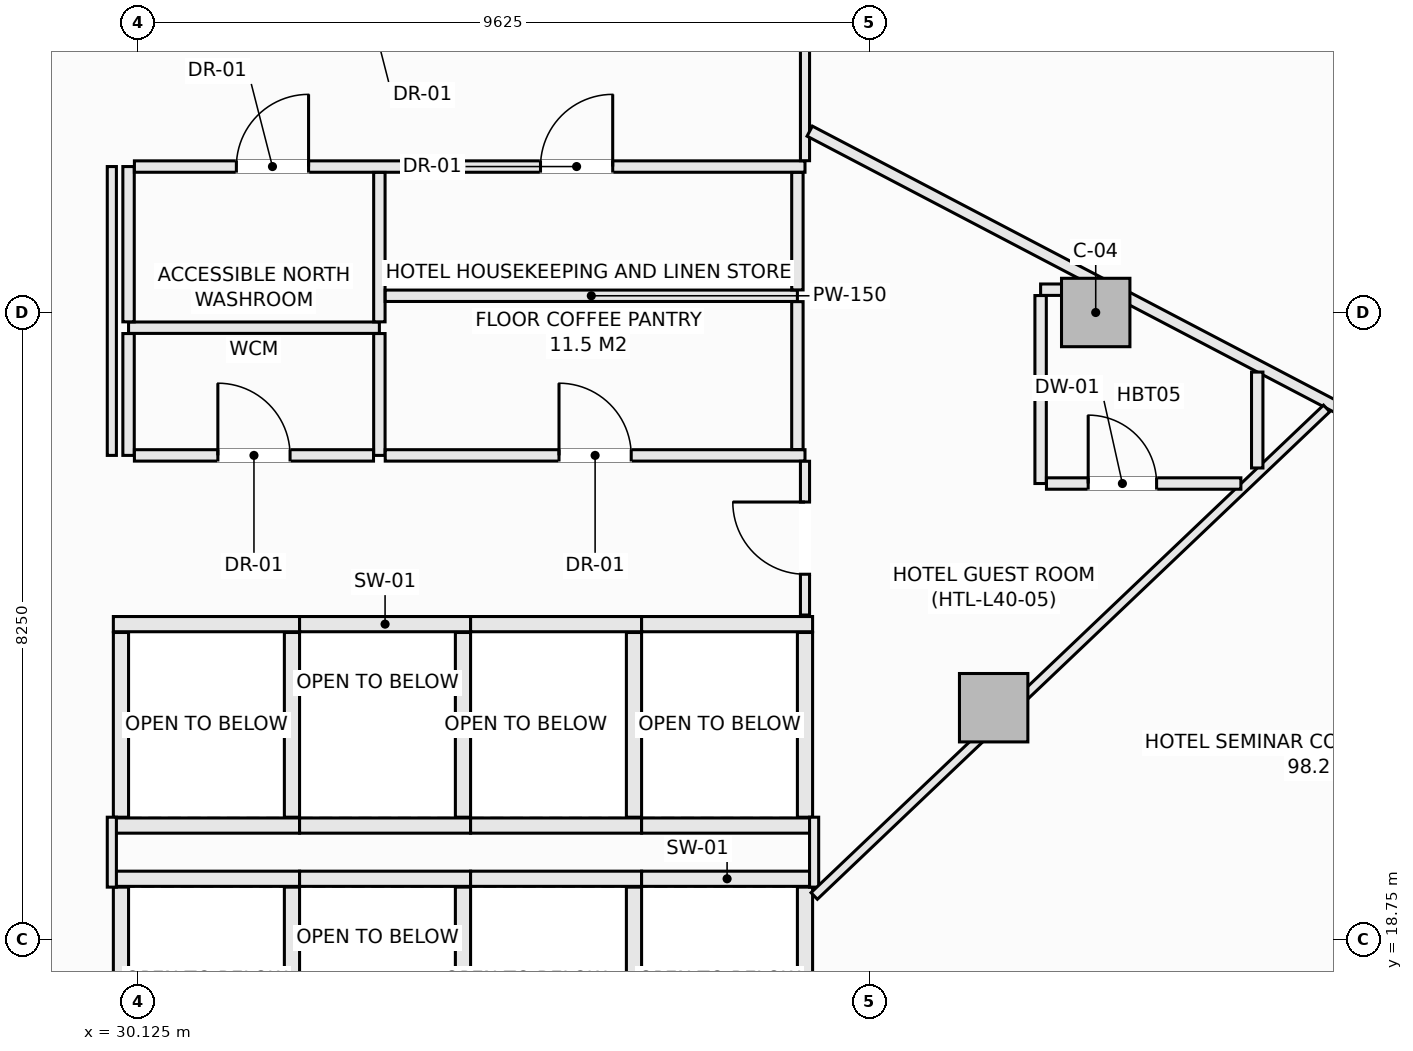
"""IFC4 building model, lengths in metres.
Left out: names, types, materials, properties, quantities, classifications, styles, units other than length and angle.
Written with IfcOpenShell. Run it as: python <this file> out.ifc"""

import sys

from ifc_helpers import new_model, si_unit, direction, frame, frame_2d, origin, origin_2d, place, context, subcontext, project, spatial, rectangle, extrude, element, fill, save


model = new_model("IFC4")
c1 = context("Model", 3, precision=1e-05, world=origin(), true_north=direction((0.0, 1.0)))
c2 = subcontext(c1, "Body", "Model", "MODEL_VIEW")
j1 = project(units=[si_unit("LENGTHUNIT", "METRE"), si_unit("PLANEANGLEUNIT", "RADIAN")], contexts=[c1])
p1 = place(None, origin())
s1 = spatial("IfcSite", under=j1, at=p1, CompositionType="ELEMENT")
p2 = place(p1, origin())
s2 = spatial("IfcBuilding", under=s1, at=p2, CompositionType="ELEMENT")
p3 = place(p2, frame((0.0, 0.0, 156.3)))
s3 = spatial("IfcBuildingStorey", under=s2, at=p3, CompositionType="ELEMENT", Elevation=156.3)
for number, where, z_axis, x_axis in (
    (1, (42.725, 27.0, -0.27), (0.0, 0.0, 1.0), (1.0, 0.0, 0.0)),
    (2, (41.382, 21.801, -0.27), (0.0, 0.0, 1.0), (1.0, 0.0, 0.0)),
):
    element("IfcColumn", number, at=place(p3, frame(where, z_axis=z_axis, x_axis=x_axis)), inside=s3, PredefinedType="COLUMN", context=c2, shape_type="SweptSolid", body=[
        extrude(rectangle(XDim=0.9, YDim=0.9, at=origin_2d()), origin(), (0.0, 0.0, 1.0), 3.4),
    ])
p4 = place(p3, frame((44.313, 15.914, 0.0), z_axis=(0.0, 0.0, 1.0), x_axis=(0.901353070301, 0.433085029363, 0.0)))
e3 = element("IfcWall", 3, at=p4, inside=s3, PredefinedType="SOLIDWALL", context=c2, shape_type="SweptSolid", body=[
    extrude(rectangle(XDim=5.336, YDim=0.3, at=frame_2d((2.668, 0.0))), origin(), (0.0, 0.0, 1.0), 2.653),
])
p5 = place(p4, frame((1.768, 0.0, 0.0)))
e4 = element("IfcOpeningElement", 4, at=p5, cuts=e3, PredefinedType="OPENING", context=c2, shape_type="SweptSolid", body=[
    extrude(rectangle(XDim=1.8, YDim=2.25, at=frame_2d((0.9, 1.125))), frame((0.0, 0.16, 0.0), z_axis=(0.0, -1.0, 0.0), x_axis=(1.0, 0.0, 0.0)), (0.0, 0.0, 1.0), 0.32),
])
p6 = place(p3, frame((29.8, 19.55, 0.0), z_axis=(0.0, 0.0, 1.0), x_axis=(1.0, 0.0, 0.0)))
e5 = element("IfcWall", 5, at=p6, inside=s3, PredefinedType="SOLIDWALL", context=c2, shape_type="SweptSolid", body=[
    extrude(rectangle(XDim=2.45, YDim=0.2, at=frame_2d((1.225, 0.0))), origin(), (0.0, 0.0, 1.0), 3.13),
])
for number, where, z_axis, x_axis in (
    (6, (29.9, 17.01, 0.0), (0.0, 0.0, 1.0), (0.0, 1.0, 0.0)),
    (7, (32.15, 17.01, 0.0), (0.0, 0.0, 1.0), (0.0, 1.0, 0.0)),
):
    element("IfcWall", number, at=place(p3, frame(where, z_axis=z_axis, x_axis=x_axis)), inside=s3, PredefinedType="SOLIDWALL", context=c2, shape_type="SweptSolid", body=[
        extrude(rectangle(XDim=2.43, YDim=0.2, at=frame_2d((1.215, 0.0))), origin(), (0.0, 0.0, 1.0), 3.13),
    ])
p7 = place(p3, frame((32.25, 19.55, 0.0), z_axis=(0.0, 0.0, 1.0), x_axis=(1.0, 0.0, 0.0)))
e8 = element("IfcWall", 8, at=p7, inside=s3, PredefinedType="SOLIDWALL", context=c2, shape_type="SweptSolid", body=[
    extrude(rectangle(XDim=2.25, YDim=0.2, at=frame_2d((1.125, 0.0))), origin(), (0.0, 0.0, 1.0), 3.13),
])
p8 = place(p3, frame((34.4, 17.01, 0.0), z_axis=(0.0, 0.0, 1.0), x_axis=(0.0, 1.0, 0.0)))
e9 = element("IfcWall", 9, at=p8, inside=s3, PredefinedType="SOLIDWALL", context=c2, shape_type="SweptSolid", body=[
    extrude(rectangle(XDim=2.43, YDim=0.2, at=frame_2d((1.215, 0.0))), origin(), (0.0, 0.0, 1.0), 3.13),
])
p9 = place(p3, frame((34.5, 19.55, 0.0), z_axis=(0.0, 0.0, 1.0), x_axis=(1.0, 0.0, 0.0)))
e10 = element("IfcWall", 10, at=p9, inside=s3, PredefinedType="SOLIDWALL", context=c2, shape_type="SweptSolid", body=[
    extrude(rectangle(XDim=2.25, YDim=0.2, at=frame_2d((1.125, 0.0))), origin(), (0.0, 0.0, 1.0), 3.13),
])
p10 = place(p3, frame((36.65, 17.01, 0.0), z_axis=(0.0, 0.0, 1.0), x_axis=(0.0, 1.0, 0.0)))
e11 = element("IfcWall", 11, at=p10, inside=s3, PredefinedType="SOLIDWALL", context=c2, shape_type="SweptSolid", body=[
    extrude(rectangle(XDim=2.43, YDim=0.2, at=frame_2d((1.215, 0.0))), origin(), (0.0, 0.0, 1.0), 3.13),
])
p11 = place(p3, frame((36.75, 19.55, 0.0), z_axis=(0.0, 0.0, 1.0), x_axis=(1.0, 0.0, 0.0)))
e12 = element("IfcWall", 12, at=p11, inside=s3, PredefinedType="SOLIDWALL", context=c2, shape_type="SweptSolid", body=[
    extrude(rectangle(XDim=2.25, YDim=0.2, at=frame_2d((1.125, 0.0))), origin(), (0.0, 0.0, 1.0), 3.13),
])
p12 = place(p3, frame((38.9, 17.01, 0.0), z_axis=(0.0, 0.0, 1.0), x_axis=(0.0, 1.0, 0.0)))
e13 = element("IfcWall", 13, at=p12, inside=s3, PredefinedType="SOLIDWALL", context=c2, shape_type="SweptSolid", body=[
    extrude(rectangle(XDim=2.43, YDim=0.2, at=frame_2d((1.215, 0.0))), origin(), (0.0, 0.0, 1.0), 3.13),
])
for number, where, z_axis, x_axis in (
    (14, (29.8, 22.9, 0.0), (0.0, 0.0, 1.0), (1.0, 0.0, 0.0)),
    (15, (29.8, 20.25, 0.0), (0.0, 0.0, 1.0), (1.0, 0.0, 0.0)),
):
    element("IfcWall", number, at=place(p3, frame(where, z_axis=z_axis, x_axis=x_axis)), inside=s3, PredefinedType="SOLIDWALL", context=c2, shape_type="SweptSolid", body=[
        extrude(rectangle(XDim=2.45, YDim=0.2, at=frame_2d((1.225, 0.0))), origin(), (0.0, 0.0, 1.0), 3.13),
    ])
for number, where, z_axis, x_axis in (
    (16, (29.9, 20.36, 0.0), (0.0, 0.0, 1.0), (0.0, 1.0, 0.0)),
    (17, (32.15, 20.36, 0.0), (0.0, 0.0, 1.0), (0.0, 1.0, 0.0)),
):
    element("IfcWall", number, at=place(p3, frame(where, z_axis=z_axis, x_axis=x_axis)), inside=s3, PredefinedType="SOLIDWALL", context=c2, shape_type="SweptSolid", body=[
        extrude(rectangle(XDim=2.43, YDim=0.2, at=frame_2d((1.215, 0.0))), origin(), (0.0, 0.0, 1.0), 3.13),
    ])
for number, where, z_axis, x_axis in (
    (18, (32.25, 22.9, 0.0), (0.0, 0.0, 1.0), (1.0, 0.0, 0.0)),
    (19, (32.25, 20.25, 0.0), (0.0, 0.0, 1.0), (1.0, 0.0, 0.0)),
):
    element("IfcWall", number, at=place(p3, frame(where, z_axis=z_axis, x_axis=x_axis)), inside=s3, PredefinedType="SOLIDWALL", context=c2, shape_type="SweptSolid", body=[
        extrude(rectangle(XDim=2.25, YDim=0.2, at=frame_2d((1.125, 0.0))), origin(), (0.0, 0.0, 1.0), 3.13),
    ])
p13 = place(p3, frame((34.4, 20.36, 0.0), z_axis=(0.0, 0.0, 1.0), x_axis=(0.0, 1.0, 0.0)))
e20 = element("IfcWall", 20, at=p13, inside=s3, PredefinedType="SOLIDWALL", context=c2, shape_type="SweptSolid", body=[
    extrude(rectangle(XDim=2.43, YDim=0.2, at=frame_2d((1.215, 0.0))), origin(), (0.0, 0.0, 1.0), 3.13),
])
for number, where, z_axis, x_axis in (
    (21, (34.5, 22.9, 0.0), (0.0, 0.0, 1.0), (1.0, 0.0, 0.0)),
    (22, (34.5, 20.25, 0.0), (0.0, 0.0, 1.0), (1.0, 0.0, 0.0)),
):
    element("IfcWall", number, at=place(p3, frame(where, z_axis=z_axis, x_axis=x_axis)), inside=s3, PredefinedType="SOLIDWALL", context=c2, shape_type="SweptSolid", body=[
        extrude(rectangle(XDim=2.25, YDim=0.2, at=frame_2d((1.125, 0.0))), origin(), (0.0, 0.0, 1.0), 3.13),
    ])
p14 = place(p3, frame((36.65, 20.36, 0.0), z_axis=(0.0, 0.0, 1.0), x_axis=(0.0, 1.0, 0.0)))
e23 = element("IfcWall", 23, at=p14, inside=s3, PredefinedType="SOLIDWALL", context=c2, shape_type="SweptSolid", body=[
    extrude(rectangle(XDim=2.43, YDim=0.2, at=frame_2d((1.215, 0.0))), origin(), (0.0, 0.0, 1.0), 3.13),
])
for number, where, z_axis, x_axis in (
    (24, (36.75, 22.9, 0.0), (0.0, 0.0, 1.0), (1.0, 0.0, 0.0)),
    (25, (36.75, 20.25, 0.0), (0.0, 0.0, 1.0), (1.0, 0.0, 0.0)),
):
    element("IfcWall", number, at=place(p3, frame(where, z_axis=z_axis, x_axis=x_axis)), inside=s3, PredefinedType="SOLIDWALL", context=c2, shape_type="SweptSolid", body=[
        extrude(rectangle(XDim=2.25, YDim=0.2, at=frame_2d((1.125, 0.0))), origin(), (0.0, 0.0, 1.0), 3.13),
    ])
p15 = place(p3, frame((38.9, 20.36, 0.0), z_axis=(0.0, 0.0, 1.0), x_axis=(0.0, 1.0, 0.0)))
e26 = element("IfcWall", 26, at=p15, inside=s3, PredefinedType="SOLIDWALL", context=c2, shape_type="SweptSolid", body=[
    extrude(rectangle(XDim=2.43, YDim=0.2, at=frame_2d((1.215, 0.0))), origin(), (0.0, 0.0, 1.0), 3.13),
])
p16 = place(p3, frame((30.0, 26.8, 0.0), z_axis=(0.0, 0.0, 1.0), x_axis=(1.0, 0.0, 0.0)))
e27 = element("IfcWall", 27, at=p16, inside=s3, PredefinedType="PARTITIONING", context=c2, shape_type="SweptSolid", body=[
    extrude(rectangle(XDim=3.3, YDim=0.15, at=frame_2d((1.65, 0.0))), origin(), (0.0, 0.0, 1.0), 3.13),
])
p17 = place(p3, frame((30.0, 25.12, 0.0), z_axis=(0.0, 0.0, 1.0), x_axis=(0.0, 1.0, 0.0)))
e28 = element("IfcWall", 28, at=p17, inside=s3, PredefinedType="PARTITIONING", context=c2, shape_type="SweptSolid", body=[
    extrude(rectangle(XDim=1.603, YDim=0.15, at=frame_2d((0.801, 0.0))), origin(), (0.0, 0.0, 1.0), 3.13),
])
p18 = place(p3, frame((30.0, 26.877, 0.0), z_axis=(0.0, 0.0, 1.0), x_axis=(0.0, 1.0, 0.0)))
e29 = element("IfcWall", 29, at=p18, inside=s3, PredefinedType="PARTITIONING", context=c2, shape_type="SweptSolid", body=[
    extrude(rectangle(XDim=2.043, YDim=0.15, at=frame_2d((1.021, 0.0))), origin(), (0.0, 0.0, 1.0), 3.13),
])
p19 = place(p3, frame((30.077, 28.92, 0.0), z_axis=(0.0, 0.0, 1.0), x_axis=(1.0, 0.0, 0.0)))
e30 = element("IfcWall", 30, at=p19, inside=s3, PredefinedType="PARTITIONING", context=c2, shape_type="SweptSolid", body=[
    extrude(rectangle(XDim=8.823, YDim=0.15, at=frame_2d((4.412, 0.0))), origin(), (0.0, 0.0, 1.0), 3.13),
])
p20 = place(p19, frame((1.342, 0.0, 0.0)))
e31 = element("IfcOpeningElement", 31, at=p20, cuts=e30, PredefinedType="OPENING", context=c2, shape_type="SweptSolid", body=[
    extrude(rectangle(XDim=0.95, YDim=2.1, at=frame_2d((0.475, 1.05))), frame((0.0, 0.085, 0.0), z_axis=(0.0, -1.0, 0.0), x_axis=(1.0, 0.0, 0.0)), (0.0, 0.0, 1.0), 0.17),
])
p21 = place(p19, frame((5.343, 0.0, 0.0)))
e32 = element("IfcOpeningElement", 32, at=p21, cuts=e30, PredefinedType="OPENING", context=c2, shape_type="SweptSolid", body=[
    extrude(rectangle(XDim=0.95, YDim=2.1, at=frame_2d((0.475, 1.05))), frame((0.0, 0.085, 0.0), z_axis=(0.0, -1.0, 0.0), x_axis=(1.0, 0.0, 0.0)), (0.0, 0.0, 1.0), 0.17),
])
p22 = place(p3, frame((33.3, 25.12, 0.0), z_axis=(0.0, 0.0, 1.0), x_axis=(0.0, 1.0, 0.0)))
e33 = element("IfcWall", 33, at=p22, inside=s3, PredefinedType="PARTITIONING", context=c2, shape_type="SweptSolid", body=[
    extrude(rectangle(XDim=1.603, YDim=0.15, at=frame_2d((0.801, 0.0))), origin(), (0.0, 0.0, 1.0), 3.13),
])
p23 = place(p3, frame((33.3, 26.877, 0.0), z_axis=(0.0, 0.0, 1.0), x_axis=(0.0, 1.0, 0.0)))
e34 = element("IfcWall", 34, at=p23, inside=s3, PredefinedType="PARTITIONING", context=c2, shape_type="SweptSolid", body=[
    extrude(rectangle(XDim=1.966, YDim=0.15, at=frame_2d((0.983, 0.0))), origin(), (0.0, 0.0, 1.0), 3.13),
])
p24 = place(p3, frame((30.077, 25.12, 0.0), z_axis=(0.0, 0.0, 1.0), x_axis=(1.0, 0.0, 0.0)))
e35 = element("IfcWall", 35, at=p24, inside=s3, PredefinedType="PARTITIONING", context=c2, shape_type="SweptSolid", body=[
    extrude(rectangle(XDim=3.146, YDim=0.15, at=frame_2d((1.573, 0.0))), origin(), (0.0, 0.0, 1.0), 3.13),
])
p25 = place(p24, frame((1.098, 0.0, 0.0)))
e36 = element("IfcOpeningElement", 36, at=p25, cuts=e35, PredefinedType="OPENING", context=c2, shape_type="SweptSolid", body=[
    extrude(rectangle(XDim=0.95, YDim=2.1, at=frame_2d((0.475, 1.05))), frame((0.0, 0.085, 0.0), z_axis=(0.0, -1.0, 0.0), x_axis=(1.0, 0.0, 0.0)), (0.0, 0.0, 1.0), 0.17),
])
p26 = place(p3, frame((33.377, 25.12, 0.0), z_axis=(0.0, 0.0, 1.0), x_axis=(1.0, 0.0, 0.0)))
e37 = element("IfcWall", 37, at=p26, inside=s3, PredefinedType="PARTITIONING", context=c2, shape_type="SweptSolid", body=[
    extrude(rectangle(XDim=5.523, YDim=0.15, at=frame_2d((2.761, 0.0))), origin(), (0.0, 0.0, 1.0), 3.13),
])
p27 = place(p26, frame((2.287, 0.0, 0.0)))
e38 = element("IfcOpeningElement", 38, at=p27, cuts=e37, PredefinedType="OPENING", context=c2, shape_type="SweptSolid", body=[
    extrude(rectangle(XDim=0.95, YDim=2.1, at=frame_2d((0.475, 1.05))), frame((0.0, 0.085, 0.0), z_axis=(0.0, -1.0, 0.0), x_axis=(1.0, 0.0, 0.0)), (0.0, 0.0, 1.0), 0.17),
])
p28 = place(p3, frame((33.377, 27.22, 0.0), z_axis=(0.0, 0.0, 1.0), x_axis=(1.0, 0.0, 0.0)))
e39 = element("IfcWall", 39, at=p28, inside=s3, PredefinedType="PARTITIONING", context=c2, shape_type="SweptSolid", body=[
    extrude(rectangle(XDim=5.423, YDim=0.15, at=frame_2d((2.711, 0.0))), origin(), (0.0, 0.0, 1.0), 3.13),
])
p29 = place(p3, frame((38.8, 25.197, 0.0), z_axis=(0.0, 0.0, 1.0), x_axis=(0.0, 1.0, 0.0)))
e40 = element("IfcWall", 40, at=p29, inside=s3, PredefinedType="PARTITIONING", context=c2, shape_type="SweptSolid", body=[
    extrude(rectangle(XDim=1.946, YDim=0.15, at=frame_2d((0.973, 0.0))), origin(), (0.0, 0.0, 1.0), 3.13),
])
p30 = place(p3, frame((38.8, 27.297, 0.0), z_axis=(0.0, 0.0, 1.0), x_axis=(0.0, 1.0, 0.0)))
e41 = element("IfcWall", 41, at=p30, inside=s3, PredefinedType="PARTITIONING", context=c2, shape_type="SweptSolid", body=[
    extrude(rectangle(XDim=1.546, YDim=0.15, at=frame_2d((0.773, 0.0))), origin(), (0.0, 0.0, 1.0), 3.13),
])
for number, where, z_axis, x_axis in (
    (42, (39.02, 19.44, 0.0), (0.0, 0.0, 1.0), (0.0, 1.0, 0.0)),
    (43, (29.78, 19.44, 0.0), (0.0, 0.0, 1.0), (0.0, 1.0, 0.0)),
):
    element("IfcWall", number, at=place(p3, frame(where, z_axis=z_axis, x_axis=x_axis)), inside=s3, PredefinedType="PARTITIONING", context=c2, shape_type="SweptSolid", body=[
        extrude(rectangle(XDim=0.92, YDim=0.12, at=frame_2d((0.46, 0.0))), origin(), (0.0, 0.0, 1.0), 3.13),
    ])
p31 = place(p3, frame((29.78, 25.12, 0.0), z_axis=(0.0, 0.0, 1.0), x_axis=(0.0, 1.0, 0.0)))
e44 = element("IfcWall", 44, at=p31, inside=s3, PredefinedType="PARTITIONING", context=c2, shape_type="SweptSolid", body=[
    extrude(rectangle(XDim=3.8, YDim=0.12, at=frame_2d((1.9, 0.0))), origin(), (0.0, 0.0, 1.0), 3.13),
])
p32 = place(p3, frame((38.9, 23.02, 0.0), z_axis=(0.0, 0.0, 1.0), x_axis=(0.0, 1.0, 0.0)))
e45 = element("IfcWall", 45, at=p32, inside=s3, PredefinedType="PARTITIONING", context=c2, shape_type="SweptSolid", body=[
    extrude(rectangle(XDim=2.023, YDim=0.12, at=frame_2d((1.011, 0.0))), origin(), (0.0, 0.0, 1.0), 3.13),
])
p33 = place(p32, frame((0.537, 0.0, 0.0)))
e46 = element("IfcOpeningElement", 46, at=p33, cuts=e45, PredefinedType="OPENING", context=c2, shape_type="SweptSolid", body=[
    extrude(rectangle(XDim=0.95, YDim=2.1, at=frame_2d((0.475, 1.05))), frame((0.0, 0.07, 0.0), z_axis=(0.0, -1.0, 0.0), x_axis=(1.0, 0.0, 0.0)), (0.0, 0.0, 1.0), 0.14),
])
p34 = place(p3, frame((38.9, 28.997, 0.0), z_axis=(0.0, 0.0, 1.0), x_axis=(0.0, 1.0, 0.0)))
e47 = element("IfcWall", 47, at=p34, inside=s3, PredefinedType="PARTITIONING", context=c2, shape_type="SweptSolid", body=[
    extrude(rectangle(XDim=2.123, YDim=0.12, at=frame_2d((1.062, 0.0))), origin(), (0.0, 0.0, 1.0), 3.13),
])
p35 = place(p3, frame((38.962, 29.386, 0.0), z_axis=(0.0, 0.0, 1.0), x_axis=(0.885905291329, -0.463866160434, 0.0)))
e48 = element("IfcWall", 48, at=p35, inside=s3, PredefinedType="PARTITIONING", context=c2, shape_type="SweptSolid", body=[
    extrude(rectangle(XDim=13.863, YDim=0.15, at=frame_2d((6.931, 0.0))), origin(), (0.0, 0.0, 1.0), 2.505),
])
p36 = place(p3, frame((39.021, 19.324, 0.0), z_axis=(0.0, 0.0, 1.0), x_axis=(0.724517158733, 0.689256763986, 0.0)))
e49 = element("IfcWall", 49, at=p36, inside=s3, PredefinedType="PARTITIONING", context=c2, shape_type="SweptSolid", body=[
    extrude(rectangle(XDim=9.306, YDim=0.12, at=frame_2d((4.653, 0.0))), origin(), (0.0, 0.0, 1.0), 2.505),
])
p37 = place(p3, frame((42.0, 27.3, 0.0), z_axis=(0.0, 0.0, 1.0), x_axis=(1.0, 0.0, 0.0)))
e50 = element("IfcWall", 50, at=p37, inside=s3, PredefinedType="PARTITIONING", context=c2, shape_type="SweptSolid", body=[
    extrude(rectangle(XDim=0.78, YDim=0.15, at=frame_2d((0.39, 0.0))), origin(), (0.0, 0.0, 1.0), 3.13),
])
p38 = place(p3, frame((42.0, 24.75, 0.0), z_axis=(0.0, 0.0, 1.0), x_axis=(0.0, 1.0, 0.0)))
e51 = element("IfcWall", 51, at=p38, inside=s3, PredefinedType="PARTITIONING", context=c2, shape_type="SweptSolid", body=[
    extrude(rectangle(XDim=2.473, YDim=0.15, at=frame_2d((1.236, 0.0))), origin(), (0.0, 0.0, 1.0), 2.505),
])
p39 = place(p3, frame((42.077, 24.75, 0.0), z_axis=(0.0, 0.0, 1.0), x_axis=(1.0, 0.0, 0.0)))
e52 = element("IfcWall", 52, at=p39, inside=s3, PredefinedType="PARTITIONING", context=c2, shape_type="SweptSolid", body=[
    extrude(rectangle(XDim=2.558, YDim=0.15, at=frame_2d((1.279, 0.0))), origin(), (0.0, 0.0, 1.0), 3.13),
])
p40 = place(p39, frame((0.549, 0.0, 0.0)))
e53 = element("IfcOpeningElement", 53, at=p40, cuts=e52, PredefinedType="OPENING", context=c2, shape_type="SweptSolid", body=[
    extrude(rectangle(XDim=0.9, YDim=2.1, at=frame_2d((0.45, 1.05))), frame((0.0, 0.085, 0.0), z_axis=(0.0, -1.0, 0.0), x_axis=(1.0, 0.0, 0.0)), (0.0, 0.0, 1.0), 0.17),
])
p41 = place(p3, frame((44.85, 24.955, 0.0), z_axis=(0.0, 0.0, 1.0), x_axis=(0.0, 1.0, 0.0)))
e54 = element("IfcWall", 54, at=p41, inside=s3, PredefinedType="PARTITIONING", context=c2, shape_type="SweptSolid", body=[
    extrude(rectangle(XDim=1.261, YDim=0.15, at=frame_2d((0.631, 0.0))), origin(), (0.0, 0.0, 1.0), 3.13),
])
p42 = place(p20, origin())
e55 = element("IfcDoor", 55, at=p42, inside=s3, OperationType="SINGLE_SWING_RIGHT", PredefinedType="DOOR", context=c2, shape_type="SweptSolid", body=[
    extrude(rectangle(XDim=0.95, YDim=2.1, at=frame_2d((0.475, 1.05))), frame((0.0, 0.025, 0.0), z_axis=(0.0, -1.0, 0.0), x_axis=(1.0, 0.0, 0.0)), (0.0, 0.0, 1.0), 0.05),
])
fill(e31, e55)
p43 = place(p25, origin())
e56 = element("IfcDoor", 56, at=p43, inside=s3, OperationType="SINGLE_SWING_LEFT", PredefinedType="DOOR", context=c2, shape_type="SweptSolid", body=[
    extrude(rectangle(XDim=0.95, YDim=2.1, at=frame_2d((0.475, 1.05))), frame((0.0, 0.025, 0.0), z_axis=(0.0, -1.0, 0.0), x_axis=(1.0, 0.0, 0.0)), (0.0, 0.0, 1.0), 0.05),
])
fill(e36, e56)
p44 = place(p21, origin())
e57 = element("IfcDoor", 57, at=p44, inside=s3, OperationType="SINGLE_SWING_RIGHT", PredefinedType="DOOR", context=c2, shape_type="SweptSolid", body=[
    extrude(rectangle(XDim=0.95, YDim=2.1, at=frame_2d((0.475, 1.05))), frame((0.0, 0.025, 0.0), z_axis=(0.0, -1.0, 0.0), x_axis=(1.0, 0.0, 0.0)), (0.0, 0.0, 1.0), 0.05),
])
fill(e32, e57)
p45 = place(p27, origin())
e58 = element("IfcDoor", 58, at=p45, inside=s3, OperationType="SINGLE_SWING_LEFT", PredefinedType="DOOR", context=c2, shape_type="SweptSolid", body=[
    extrude(rectangle(XDim=0.95, YDim=2.1, at=frame_2d((0.475, 1.05))), frame((0.0, 0.025, 0.0), z_axis=(0.0, -1.0, 0.0), x_axis=(1.0, 0.0, 0.0)), (0.0, 0.0, 1.0), 0.05),
])
fill(e38, e58)
p46 = place(p33, origin())
e59 = element("IfcDoor", 59, at=p46, inside=s3, OperationType="SINGLE_SWING_RIGHT", PredefinedType="DOOR", context=c2, shape_type="SweptSolid", body=[
    extrude(rectangle(XDim=0.95, YDim=2.1, at=frame_2d((0.475, 1.05))), frame((0.0, 0.025, 0.0), z_axis=(0.0, -1.0, 0.0), x_axis=(1.0, 0.0, 0.0)), (0.0, 0.0, 1.0), 0.05),
])
fill(e46, e59)
p47 = place(p40, origin())
e60 = element("IfcDoor", 60, at=p47, inside=s3, OperationType="SINGLE_SWING_LEFT", PredefinedType="DOOR", context=c2, shape_type="SweptSolid", body=[
    extrude(rectangle(XDim=0.9, YDim=2.1, at=frame_2d((0.45, 1.05))), frame((0.0, 0.025, 0.0), z_axis=(0.0, -1.0, 0.0), x_axis=(1.0, 0.0, 0.0)), (0.0, 0.0, 1.0), 0.05),
])
fill(e53, e60)
save(model, sys.argv[1])
